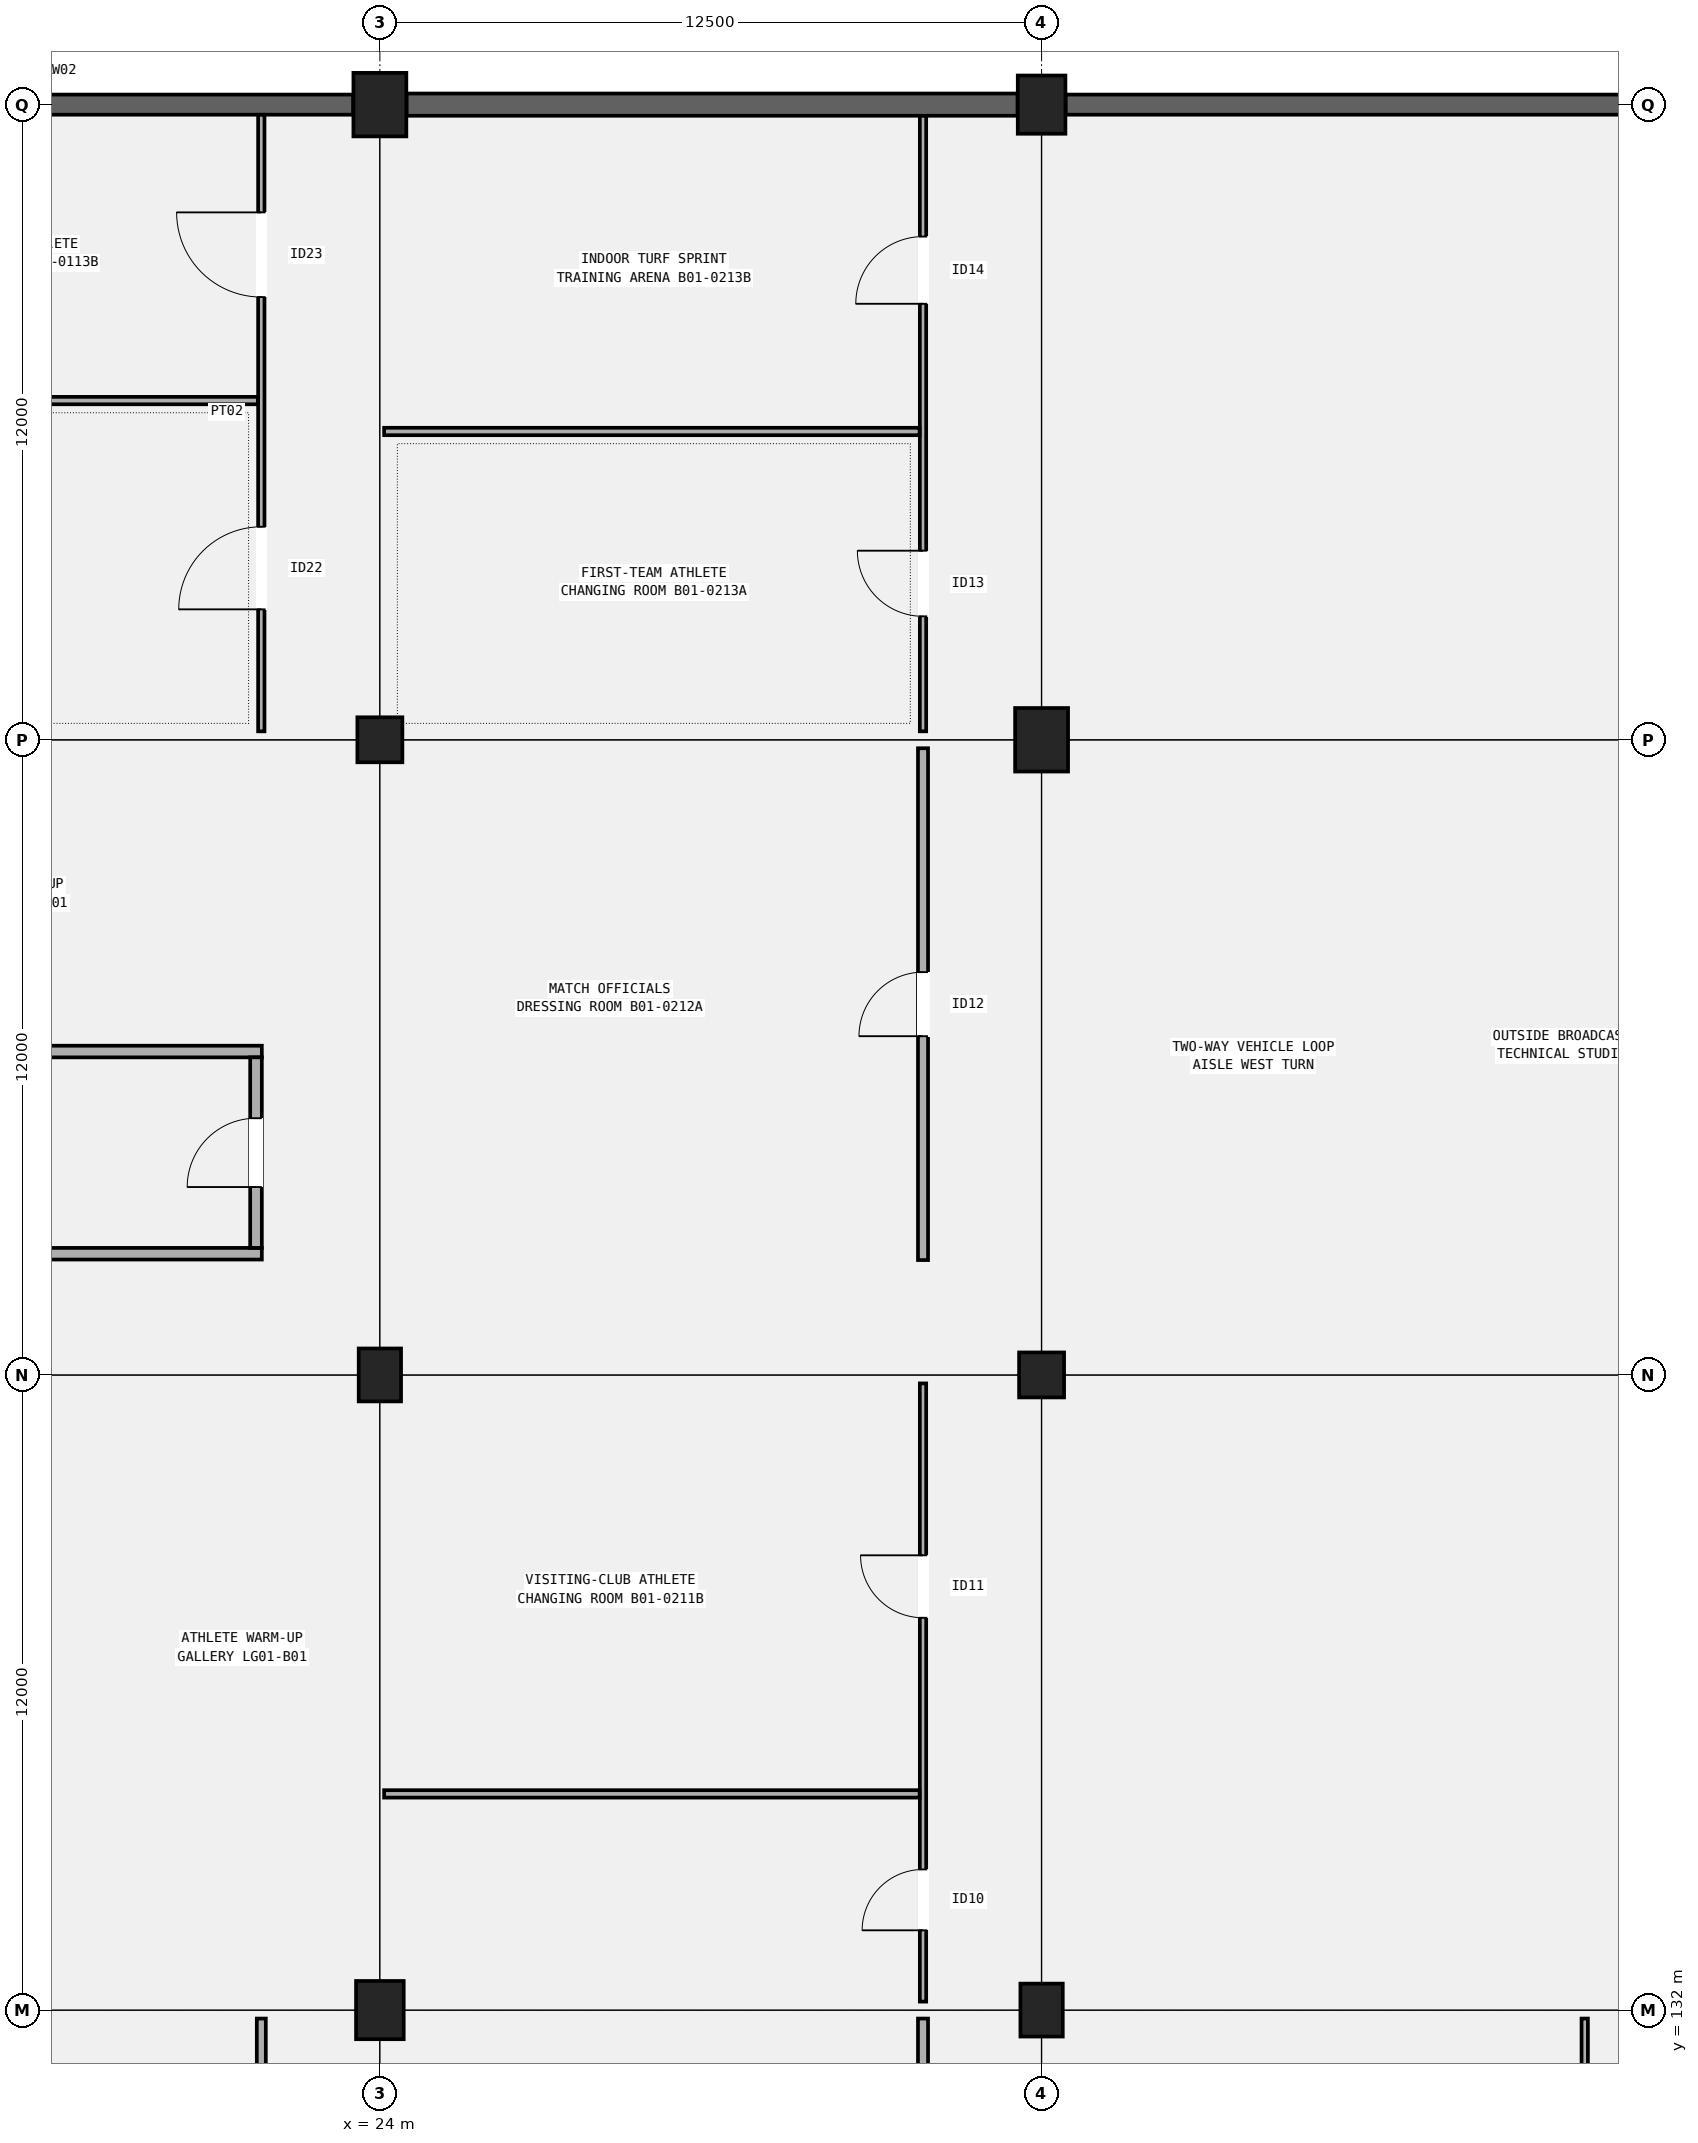
"""IFC4 building model, lengths in metres.
Left out: names, types, materials, properties, quantities, classifications, styles, units other than length and angle.
Written with IfcOpenShell. Run it as: python <this file> out.ifc"""

import sys

from ifc_helpers import new_model, si_unit, direction, frame, frame_2d, origin, origin_2d, place, context, subcontext, project, spatial, rectangle, circle, extrude, element, fill, save


model = new_model("IFC4")
c1 = context("Model", 3, precision=1e-05, world=origin(), true_north=direction((0.0, 1.0)))
c2 = subcontext(c1, "Body", "Model", "MODEL_VIEW")
j1 = project(units=[si_unit("LENGTHUNIT", "METRE"), si_unit("PLANEANGLEUNIT", "RADIAN")], contexts=[c1])
p1 = place(None, origin())
s1 = spatial("IfcSite", under=j1, at=p1, CompositionType="ELEMENT")
p2 = place(p1, origin())
s2 = spatial("IfcBuilding", under=s1, at=p2, CompositionType="ELEMENT")
p3 = place(p2, frame((0.0, 0.0, -4.8)))
s3 = spatial("IfcBuildingStorey", under=s2, at=p3, CompositionType="ELEMENT", Elevation=-4.8)
p4 = place(p3, frame((24.0, 132.0, 0.0), z_axis=(0.0, 0.0, 1.0), x_axis=(1.0, 0.0, 0.0)))
e1 = element("IfcColumn", 1, at=p4, inside=s3, PredefinedType="COLUMN", context=c2, shape_type="SweptSolid", body=[
    extrude(rectangle(XDim=0.9, YDim=1.1, at=origin_2d()), origin(), (0.0, 0.0, 1.0), 4.8),
])
p5 = place(p3, frame((24.0, 144.0, 0.0), z_axis=(0.0, 0.0, 1.0), x_axis=(1.0, 0.0, 0.0)))
e2 = element("IfcColumn", 2, at=p5, inside=s3, PredefinedType="COLUMN", context=c2, shape_type="SweptSolid", body=[
    extrude(rectangle(XDim=0.8, YDim=1.0, at=origin_2d()), origin(), (0.0, 0.0, 1.0), 4.8),
])
p6 = place(p3, frame((24.0, 156.0, 0.0), z_axis=(0.0, 0.0, 1.0), x_axis=(1.0, 0.0, 0.0)))
e3 = element("IfcColumn", 3, at=p6, inside=s3, PredefinedType="COLUMN", context=c2, shape_type="SweptSolid", body=[
    extrude(circle(Radius=0.425, at=origin_2d()), origin(), (0.0, 0.0, 1.0), 4.8),
])
p7 = place(p3, frame((24.0, 168.0, 0.0), z_axis=(0.0, 0.0, 1.0), x_axis=(1.0, 0.0, 0.0)))
e4 = element("IfcColumn", 4, at=p7, inside=s3, PredefinedType="COLUMN", context=c2, shape_type="SweptSolid", body=[
    extrude(rectangle(XDim=1.0, YDim=1.2, at=origin_2d()), origin(), (0.0, 0.0, 1.0), 4.8),
])
p8 = place(p3, frame((36.5, 132.0, 0.0), z_axis=(0.0, 0.0, 1.0), x_axis=(1.0, 0.0, 0.0)))
e5 = element("IfcColumn", 5, at=p8, inside=s3, PredefinedType="COLUMN", context=c2, shape_type="SweptSolid", body=[
    extrude(rectangle(XDim=0.8, YDim=1.0, at=origin_2d()), origin(), (0.0, 0.0, 1.0), 4.8),
])
p9 = place(p3, frame((36.5, 144.0, 0.0), z_axis=(0.0, 0.0, 1.0), x_axis=(1.0, 0.0, 0.0)))
e6 = element("IfcColumn", 6, at=p9, inside=s3, PredefinedType="COLUMN", context=c2, shape_type="SweptSolid", body=[
    extrude(circle(Radius=0.425, at=origin_2d()), origin(), (0.0, 0.0, 1.0), 4.8),
])
p10 = place(p3, frame((36.5, 156.0, 0.0), z_axis=(0.0, 0.0, 1.0), x_axis=(1.0, 0.0, 0.0)))
e7 = element("IfcColumn", 7, at=p10, inside=s3, PredefinedType="COLUMN", context=c2, shape_type="SweptSolid", body=[
    extrude(rectangle(XDim=1.0, YDim=1.2, at=origin_2d()), origin(), (0.0, 0.0, 1.0), 4.8),
])
p11 = place(p3, frame((36.5, 168.0, 0.0), z_axis=(0.0, 0.0, 1.0), x_axis=(1.0, 0.0, 0.0)))
e8 = element("IfcColumn", 8, at=p11, inside=s3, PredefinedType="COLUMN", context=c2, shape_type="SweptSolid", body=[
    extrude(rectangle(XDim=0.9, YDim=1.1, at=origin_2d()), origin(), (0.0, 0.0, 1.0), 4.8),
])
p12 = place(p3, frame((12.429, 168.0, 0.0), z_axis=(0.0, 0.0, 1.0), x_axis=(1.0, 0.0, 0.0)))
e9 = element("IfcWall", 9, at=p12, inside=s3, PredefinedType="STANDARD", context=c2, shape_type="SweptSolid", body=[
    extrude(rectangle(XDim=11.067, YDim=0.38, at=frame_2d((5.534, 0.0))), origin(), (0.0, 0.0, 1.0), 4.46),
])
p13 = place(p3, frame((24.504, 168.0, 0.0), z_axis=(0.0, 0.0, 1.0), x_axis=(1.0, 0.0, 0.0)))
e10 = element("IfcWall", 10, at=p13, inside=s3, PredefinedType="STANDARD", context=c2, shape_type="SweptSolid", body=[
    extrude(rectangle(XDim=11.542, YDim=0.42, at=frame_2d((5.771, 0.0))), origin(), (0.0, 0.0, 1.0), 4.46),
])
p14 = place(p3, frame((36.954, 168.0, 0.0), z_axis=(0.0, 0.0, 1.0), x_axis=(1.0, 0.0, 0.0)))
e11 = element("IfcWall", 11, at=p14, inside=s3, PredefinedType="STANDARD", context=c2, shape_type="SweptSolid", body=[
    extrude(rectangle(XDim=11.642, YDim=0.38, at=frame_2d((5.821, 0.0))), origin(), (0.0, 0.0, 1.0), 4.46),
])
for number, where, z_axis, x_axis in (
    (12, (17.48, 146.29, -0.65), (0.0, 0.0, 1.0), (1.0, 0.0, 0.0)),
    (13, (17.48, 150.11, -0.65), (0.0, 0.0, 1.0), (1.0, 0.0, 0.0)),
):
    element("IfcWall", number, at=place(p3, frame(where, z_axis=z_axis, x_axis=x_axis)), inside=s3, PredefinedType="SOLIDWALL", context=c2, shape_type="SweptSolid", body=[
        extrude(rectangle(XDim=4.29, YDim=0.22, at=frame_2d((2.145, 0.0))), origin(), (0.0, 0.0, 1.0), 4.57),
    ])
p15 = place(p3, frame((21.66, 146.4, -0.65), z_axis=(0.0, 0.0, 1.0), x_axis=(0.0, 1.0, 0.0)))
e14 = element("IfcWall", 14, at=p15, inside=s3, PredefinedType="SOLIDWALL", context=c2, shape_type="SweptSolid", body=[
    extrude(rectangle(XDim=3.6, YDim=0.22, at=frame_2d((1.8, 0.0))), origin(), (0.0, 0.0, 1.0), 4.57),
])
p16 = place(p15, frame((1.15, 0.0, 0.65)))
e15 = element("IfcOpeningElement", 15, at=p16, cuts=e14, PredefinedType="OPENING", context=c2, shape_type="SweptSolid", body=[
    extrude(rectangle(XDim=1.3, YDim=2.15, at=frame_2d((0.65, 1.075))), frame((0.0, 0.12, 0.0), z_axis=(0.0, -1.0, 0.0), x_axis=(1.0, 0.0, 0.0)), (0.0, 0.0, 1.0), 0.24),
])
p17 = place(p3, frame((21.76, 120.16, 0.0), z_axis=(0.0, 0.0, 1.0), x_axis=(0.0, 1.0, 0.0)))
e16 = element("IfcWall", 16, at=p17, inside=s3, PredefinedType="PARTITIONING", context=c2, shape_type="SweptSolid", body=[
    extrude(rectangle(XDim=11.68, YDim=0.17, at=frame_2d((5.84, 0.0))), origin(), (0.0, 0.0, 1.0), 3.92),
])
p18 = place(p17, frame((0.972, 0.0, 0.0)))
e17 = element("IfcOpeningElement", 17, at=p18, cuts=e16, PredefinedType="OPENING", context=c2, shape_type="SweptSolid", body=[
    extrude(rectangle(XDim=1.48, YDim=2.24, at=frame_2d((0.74, 1.12))), frame((0.0, 0.095, 0.0), z_axis=(0.0, -1.0, 0.0), x_axis=(1.0, 0.0, 0.0)), (0.0, 0.0, 1.0), 0.19),
])
p19 = place(p17, frame((6.872, 0.0, 0.0)))
e18 = element("IfcOpeningElement", 18, at=p19, cuts=e16, PredefinedType="OPENING", context=c2, shape_type="SweptSolid", body=[
    extrude(rectangle(XDim=1.52, YDim=2.28, at=frame_2d((0.76, 1.14))), frame((0.0, 0.095, 0.0), z_axis=(0.0, -1.0, 0.0), x_axis=(1.0, 0.0, 0.0)), (0.0, 0.0, 1.0), 0.19),
])
p20 = place(p3, frame((21.76, 156.16, 0.0), z_axis=(0.0, 0.0, 1.0), x_axis=(0.0, 1.0, 0.0)))
e19 = element("IfcWall", 19, at=p20, inside=s3, PredefinedType="PARTITIONING", context=c2, shape_type="SweptSolid", body=[
    extrude(rectangle(XDim=11.648, YDim=0.12, at=frame_2d((5.824, 0.0))), origin(), (0.0, 0.0, 1.0), 3.92),
])
p21 = place(p20, frame((2.304, 0.0, 0.0)))
e20 = element("IfcOpeningElement", 20, at=p21, cuts=e19, PredefinedType="OPENING", context=c2, shape_type="SweptSolid", body=[
    extrude(rectangle(XDim=1.56, YDim=2.26, at=frame_2d((0.78, 1.13))), frame((0.0, 0.07, 0.0), z_axis=(0.0, -1.0, 0.0), x_axis=(1.0, 0.0, 0.0)), (0.0, 0.0, 1.0), 0.14),
])
p22 = place(p20, frame((8.204, 0.0, 0.0)))
e21 = element("IfcOpeningElement", 21, at=p22, cuts=e19, PredefinedType="OPENING", context=c2, shape_type="SweptSolid", body=[
    extrude(rectangle(XDim=1.6, YDim=2.3, at=frame_2d((0.8, 1.15))), frame((0.0, 0.07, 0.0), z_axis=(0.0, -1.0, 0.0), x_axis=(1.0, 0.0, 0.0)), (0.0, 0.0, 1.0), 0.14),
])
p23 = place(p3, frame((12.08, 162.409, 0.0), z_axis=(0.0, 0.0, 1.0), x_axis=(1.0, 0.0, 0.0)))
e22 = element("IfcWall", 22, at=p23, inside=s3, PredefinedType="PARTITIONING", context=c2, shape_type="SweptSolid", body=[
    extrude(rectangle(XDim=9.615, YDim=0.14, at=frame_2d((4.808, 0.0))), origin(), (0.0, 0.0, 1.0), 3.92),
])
p24 = place(p3, frame((34.26, 120.16, 0.0), z_axis=(0.0, 0.0, 1.0), x_axis=(0.0, 1.0, 0.0)))
e23 = element("IfcWall", 23, at=p24, inside=s3, PredefinedType="PARTITIONING", context=c2, shape_type="SweptSolid", body=[
    extrude(rectangle(XDim=11.68, YDim=0.19, at=frame_2d((5.84, 0.0))), origin(), (0.0, 0.0, 1.0), 3.92),
])
p25 = place(p24, frame((5.28, 0.0, 0.0)))
e24 = element("IfcOpeningElement", 24, at=p25, cuts=e23, PredefinedType="OPENING", context=c2, shape_type="SweptSolid", body=[
    extrude(rectangle(XDim=1.12, YDim=2.18, at=frame_2d((0.56, 1.09))), frame((0.0, 0.105, 0.0), z_axis=(0.0, -1.0, 0.0), x_axis=(1.0, 0.0, 0.0)), (0.0, 0.0, 1.0), 0.21),
])
p26 = place(p3, frame((34.26, 132.16, 0.0), z_axis=(0.0, 0.0, 1.0), x_axis=(0.0, 1.0, 0.0)))
e25 = element("IfcWall", 25, at=p26, inside=s3, PredefinedType="PARTITIONING", context=c2, shape_type="SweptSolid", body=[
    extrude(rectangle(XDim=11.68, YDim=0.12, at=frame_2d((5.84, 0.0))), origin(), (0.0, 0.0, 1.0), 3.92),
])
p27 = place(p26, frame((1.347, 0.0, 0.0)))
e26 = element("IfcOpeningElement", 26, at=p27, cuts=e25, PredefinedType="OPENING", context=c2, shape_type="SweptSolid", body=[
    extrude(rectangle(XDim=1.15, YDim=2.15, at=frame_2d((0.575, 1.075))), frame((0.0, 0.07, 0.0), z_axis=(0.0, -1.0, 0.0), x_axis=(1.0, 0.0, 0.0)), (0.0, 0.0, 1.0), 0.14),
])
p28 = place(p26, frame((7.252, 0.0, 0.0)))
e27 = element("IfcOpeningElement", 27, at=p28, cuts=e25, PredefinedType="OPENING", context=c2, shape_type="SweptSolid", body=[
    extrude(rectangle(XDim=1.18, YDim=2.2, at=frame_2d((0.59, 1.1))), frame((0.0, 0.07, 0.0), z_axis=(0.0, -1.0, 0.0), x_axis=(1.0, 0.0, 0.0)), (0.0, 0.0, 1.0), 0.14),
])
p29 = place(p3, frame((24.08, 136.084, 0.0), z_axis=(0.0, 0.0, 1.0), x_axis=(1.0, 0.0, 0.0)))
e28 = element("IfcWall", 28, at=p29, inside=s3, PredefinedType="PARTITIONING", context=c2, shape_type="SweptSolid", body=[
    extrude(rectangle(XDim=10.115, YDim=0.14, at=frame_2d((5.058, 0.0))), origin(), (0.0, 0.0, 1.0), 3.92),
])
p30 = place(p3, frame((34.26, 146.17, 0.0), z_axis=(0.0, 0.0, 1.0), x_axis=(0.0, 1.0, 0.0)))
e29 = element("IfcWall", 29, at=p30, inside=s3, PredefinedType="PARTITIONING", context=c2, shape_type="SweptSolid", body=[
    extrude(rectangle(XDim=9.67, YDim=0.19, at=frame_2d((4.835, 0.0))), origin(), (0.0, 0.0, 1.0), 3.92),
])
p31 = place(p30, frame((4.23, 0.0, 0.0)))
e30 = element("IfcOpeningElement", 30, at=p31, cuts=e29, PredefinedType="OPENING", context=c2, shape_type="SweptSolid", body=[
    extrude(rectangle(XDim=1.21, YDim=2.18, at=frame_2d((0.605, 1.09))), frame((0.0, 0.105, 0.0), z_axis=(0.0, -1.0, 0.0), x_axis=(1.0, 0.0, 0.0)), (0.0, 0.0, 1.0), 0.21),
])
p32 = place(p3, frame((34.26, 156.16, 0.0), z_axis=(0.0, 0.0, 1.0), x_axis=(0.0, 1.0, 0.0)))
e31 = element("IfcWall", 31, at=p32, inside=s3, PredefinedType="PARTITIONING", context=c2, shape_type="SweptSolid", body=[
    extrude(rectangle(XDim=11.628, YDim=0.12, at=frame_2d((5.814, 0.0))), origin(), (0.0, 0.0, 1.0), 3.92),
])
p33 = place(p32, frame((2.172, 0.0, 0.0)))
e32 = element("IfcOpeningElement", 32, at=p33, cuts=e31, PredefinedType="OPENING", context=c2, shape_type="SweptSolid", body=[
    extrude(rectangle(XDim=1.24, YDim=2.22, at=frame_2d((0.62, 1.11))), frame((0.0, 0.07, 0.0), z_axis=(0.0, -1.0, 0.0), x_axis=(1.0, 0.0, 0.0)), (0.0, 0.0, 1.0), 0.14),
])
p34 = place(p32, frame((8.077, 0.0, 0.0)))
e33 = element("IfcOpeningElement", 33, at=p34, cuts=e31, PredefinedType="OPENING", context=c2, shape_type="SweptSolid", body=[
    extrude(rectangle(XDim=1.27, YDim=2.2, at=frame_2d((0.635, 1.1))), frame((0.0, 0.07, 0.0), z_axis=(0.0, -1.0, 0.0), x_axis=(1.0, 0.0, 0.0)), (0.0, 0.0, 1.0), 0.14),
])
p35 = place(p3, frame((24.08, 161.825, 0.0), z_axis=(0.0, 0.0, 1.0), x_axis=(1.0, 0.0, 0.0)))
e34 = element("IfcWall", 34, at=p35, inside=s3, PredefinedType="PARTITIONING", context=c2, shape_type="SweptSolid", body=[
    extrude(rectangle(XDim=10.115, YDim=0.14, at=frame_2d((5.058, 0.0))), origin(), (0.0, 0.0, 1.0), 3.92),
])
p36 = place(p3, frame((46.76, 120.16, 0.0), z_axis=(0.0, 0.0, 1.0), x_axis=(0.0, 1.0, 0.0)))
e35 = element("IfcWall", 35, at=p36, inside=s3, PredefinedType="PARTITIONING", context=c2, shape_type="SweptSolid", body=[
    extrude(rectangle(XDim=11.68, YDim=0.12, at=frame_2d((5.84, 0.0))), origin(), (0.0, 0.0, 1.0), 3.92),
])
p37 = place(p36, frame((2.342, 0.0, 0.0)))
e36 = element("IfcOpeningElement", 36, at=p37, cuts=e35, PredefinedType="OPENING", context=c2, shape_type="SweptSolid", body=[
    extrude(rectangle(XDim=0.9, YDim=2.06, at=frame_2d((0.45, 1.03))), frame((0.0, 0.07, 0.0), z_axis=(0.0, -1.0, 0.0), x_axis=(1.0, 0.0, 0.0)), (0.0, 0.0, 1.0), 0.14),
])
p38 = place(p36, frame((8.252, 0.0, 0.0)))
e37 = element("IfcOpeningElement", 37, at=p38, cuts=e35, PredefinedType="OPENING", context=c2, shape_type="SweptSolid", body=[
    extrude(rectangle(XDim=0.92, YDim=2.1, at=frame_2d((0.46, 1.05))), frame((0.0, 0.07, 0.0), z_axis=(0.0, -1.0, 0.0), x_axis=(1.0, 0.0, 0.0)), (0.0, 0.0, 1.0), 0.14),
])
p39 = place(p16, origin())
e38 = element("IfcDoor", 38, at=p39, inside=s3, OperationType="SINGLE_SWING_LEFT", PredefinedType="DOOR", context=c2, shape_type="SweptSolid", body=[
    extrude(rectangle(XDim=1.3, YDim=2.15, at=frame_2d((0.65, 1.075))), frame((0.0, 0.025, 0.0), z_axis=(0.0, -1.0, 0.0), x_axis=(1.0, 0.0, 0.0)), (0.0, 0.0, 1.0), 0.05),
])
fill(e15, e38)
p40 = place(p21, origin())
e39 = element("IfcDoor", 39, at=p40, inside=s3, OperationType="SINGLE_SWING_LEFT", PredefinedType="DOOR", context=c2, shape_type="SweptSolid", body=[
    extrude(rectangle(XDim=1.56, YDim=2.26, at=frame_2d((0.78, 1.13))), frame((0.0, 0.025, 0.0), z_axis=(0.0, -1.0, 0.0), x_axis=(1.0, 0.0, 0.0)), (0.0, 0.0, 1.0), 0.05),
])
fill(e20, e39)
p41 = place(p22, origin())
e40 = element("IfcDoor", 40, at=p41, inside=s3, OperationType="SINGLE_SWING_RIGHT", PredefinedType="DOOR", context=c2, shape_type="SweptSolid", body=[
    extrude(rectangle(XDim=1.6, YDim=2.3, at=frame_2d((0.8, 1.15))), frame((0.0, 0.025, 0.0), z_axis=(0.0, -1.0, 0.0), x_axis=(1.0, 0.0, 0.0)), (0.0, 0.0, 1.0), 0.05),
])
fill(e21, e40)
p42 = place(p27, origin())
e41 = element("IfcDoor", 41, at=p42, inside=s3, OperationType="SINGLE_SWING_LEFT", PredefinedType="DOOR", context=c2, shape_type="SweptSolid", body=[
    extrude(rectangle(XDim=1.15, YDim=2.15, at=frame_2d((0.575, 1.075))), frame((0.0, 0.025, 0.0), z_axis=(0.0, -1.0, 0.0), x_axis=(1.0, 0.0, 0.0)), (0.0, 0.0, 1.0), 0.05),
])
fill(e26, e41)
p43 = place(p28, origin())
e42 = element("IfcDoor", 42, at=p43, inside=s3, OperationType="SINGLE_SWING_RIGHT", PredefinedType="DOOR", context=c2, shape_type="SweptSolid", body=[
    extrude(rectangle(XDim=1.18, YDim=2.2, at=frame_2d((0.59, 1.1))), frame((0.0, 0.025, 0.0), z_axis=(0.0, -1.0, 0.0), x_axis=(1.0, 0.0, 0.0)), (0.0, 0.0, 1.0), 0.05),
])
fill(e27, e42)
p44 = place(p31, origin())
e43 = element("IfcDoor", 43, at=p44, inside=s3, OperationType="SINGLE_SWING_LEFT", PredefinedType="DOOR", context=c2, shape_type="SweptSolid", body=[
    extrude(rectangle(XDim=1.21, YDim=2.18, at=frame_2d((0.605, 1.09))), frame((0.0, 0.025, 0.0), z_axis=(0.0, -1.0, 0.0), x_axis=(1.0, 0.0, 0.0)), (0.0, 0.0, 1.0), 0.05),
])
fill(e30, e43)
p45 = place(p33, origin())
e44 = element("IfcDoor", 44, at=p45, inside=s3, OperationType="SINGLE_SWING_RIGHT", PredefinedType="DOOR", context=c2, shape_type="SweptSolid", body=[
    extrude(rectangle(XDim=1.24, YDim=2.22, at=frame_2d((0.62, 1.11))), frame((0.0, 0.025, 0.0), z_axis=(0.0, -1.0, 0.0), x_axis=(1.0, 0.0, 0.0)), (0.0, 0.0, 1.0), 0.05),
])
fill(e32, e44)
p46 = place(p34, origin())
e45 = element("IfcDoor", 45, at=p46, inside=s3, OperationType="SINGLE_SWING_LEFT", PredefinedType="DOOR", context=c2, shape_type="SweptSolid", body=[
    extrude(rectangle(XDim=1.27, YDim=2.2, at=frame_2d((0.635, 1.1))), frame((0.0, 0.025, 0.0), z_axis=(0.0, -1.0, 0.0), x_axis=(1.0, 0.0, 0.0)), (0.0, 0.0, 1.0), 0.05),
])
fill(e33, e45)
save(model, sys.argv[1])
